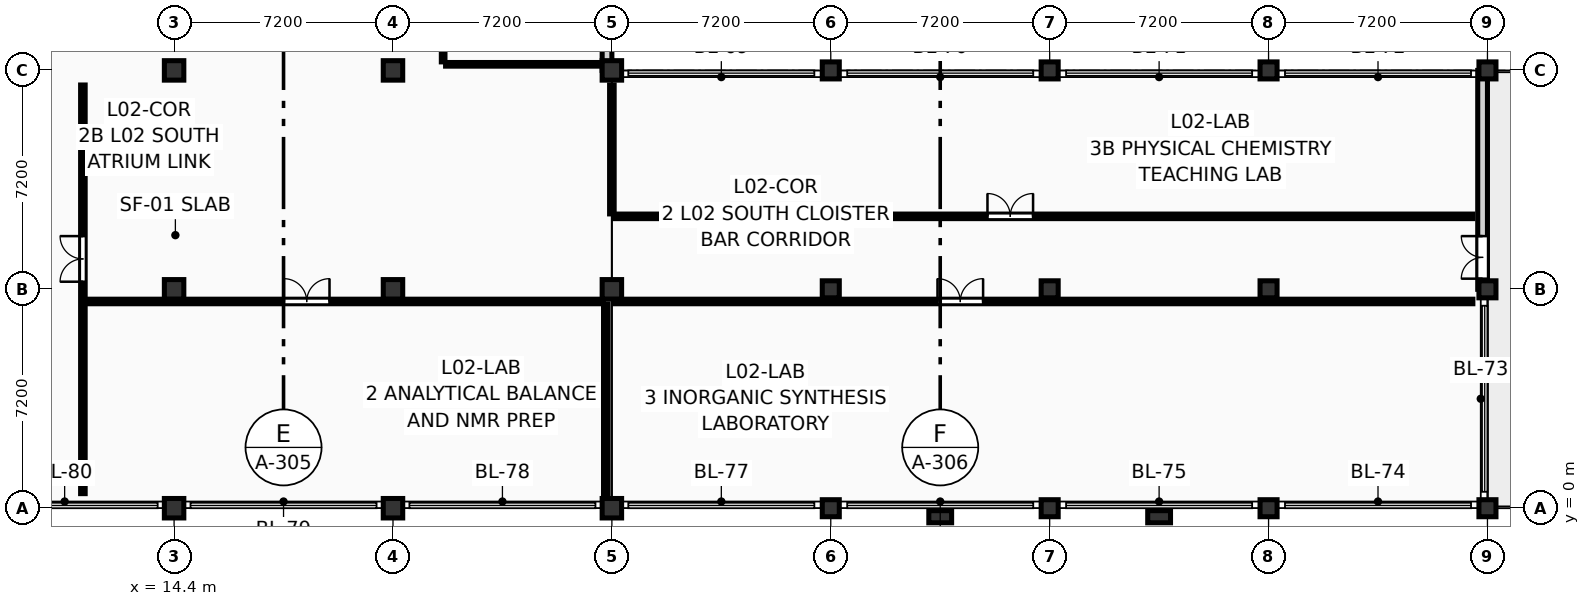
"""IFC4 building model, lengths in metres.
Left out: names, types, materials, properties, quantities, classifications, styles, units other than length and angle.
Written with IfcOpenShell. Run it as: python <this file> out.ifc"""

import sys

from ifc_helpers import new_model, si_unit, direction, frame, frame_2d, origin, origin_2d, place, context, subcontext, project, spatial, rectangle, extrude, element, fill, save


model = new_model("IFC4")
c1 = context("Model", 3, precision=1e-05, world=origin(), true_north=direction((0.0, 1.0)))
c2 = subcontext(c1, "Body", "Model", "MODEL_VIEW")
j1 = project(units=[si_unit("LENGTHUNIT", "METRE"), si_unit("PLANEANGLEUNIT", "RADIAN")], contexts=[c1])
p1 = place(None, origin())
s1 = spatial("IfcSite", under=j1, at=p1, CompositionType="ELEMENT")
p2 = place(p1, origin())
s2 = spatial("IfcBuilding", under=s1, at=p2, CompositionType="ELEMENT")
p3 = place(p2, frame((0.0, 0.0, 8.55)))
s3 = spatial("IfcBuildingStorey", under=s2, at=p3, CompositionType="ELEMENT", Elevation=8.55)
for number, where, z_axis, x_axis in (
    (1, (14.4, 0.0, 0.0), (0.0, 0.0, 1.0), (1.0, 0.0, 0.0)),
    (2, (14.4, 7.2, 0.0), (0.0, 0.0, 1.0), (1.0, 0.0, 0.0)),
    (3, (14.4, 14.4, 0.0), (0.0, 0.0, 1.0), (1.0, 0.0, 0.0)),
    (4, (21.6, 0.0, 0.0), (0.0, 0.0, 1.0), (1.0, 0.0, 0.0)),
    (5, (21.6, 7.2, 0.0), (0.0, 0.0, 1.0), (1.0, 0.0, 0.0)),
    (6, (21.6, 14.4, 0.0), (0.0, 0.0, 1.0), (1.0, 0.0, 0.0)),
    (7, (28.8, 0.0, 0.0), (0.0, 0.0, 1.0), (1.0, 0.0, 0.0)),
    (8, (28.8, 7.2, 0.0), (0.0, 0.0, 1.0), (1.0, 0.0, 0.0)),
    (9, (28.8, 14.4, 0.0), (0.0, 0.0, 1.0), (1.0, 0.0, 0.0)),
):
    element("IfcColumn", number, at=place(p3, frame(where, z_axis=z_axis, x_axis=x_axis)), inside=s3, PredefinedType="COLUMN", context=c2, shape_type="SweptSolid", body=[
        extrude(rectangle(XDim=0.64, YDim=0.64, at=origin_2d()), origin(), (0.0, 0.0, 1.0), 3.6),
    ])
for number, where, z_axis, x_axis in (
    (10, (36.0, 0.0, 0.0), (0.0, 0.0, 1.0), (1.0, 0.0, 0.0)),
    (11, (36.0, 7.2, 0.0), (0.0, 0.0, 1.0), (1.0, 0.0, 0.0)),
    (12, (36.0, 14.4, 0.0), (0.0, 0.0, 1.0), (1.0, 0.0, 0.0)),
    (13, (43.2, 0.0, 0.0), (0.0, 0.0, 1.0), (1.0, 0.0, 0.0)),
    (14, (43.2, 7.2, 0.0), (0.0, 0.0, 1.0), (1.0, 0.0, 0.0)),
    (15, (43.2, 14.4, 0.0), (0.0, 0.0, 1.0), (1.0, 0.0, 0.0)),
    (16, (50.4, 0.0, 0.0), (0.0, 0.0, 1.0), (1.0, 0.0, 0.0)),
    (17, (50.4, 7.2, 0.0), (0.0, 0.0, 1.0), (1.0, 0.0, 0.0)),
    (18, (50.4, 14.4, 0.0), (0.0, 0.0, 1.0), (1.0, 0.0, 0.0)),
    (19, (57.6, 0.0, 0.0), (0.0, 0.0, 1.0), (1.0, 0.0, 0.0)),
    (20, (57.6, 7.2, 0.0), (0.0, 0.0, 1.0), (1.0, 0.0, 0.0)),
    (21, (57.6, 14.4, 0.0), (0.0, 0.0, 1.0), (1.0, 0.0, 0.0)),
):
    element("IfcColumn", number, at=place(p3, frame(where, z_axis=z_axis, x_axis=x_axis)), inside=s3, PredefinedType="COLUMN", context=c2, shape_type="SweptSolid", body=[
        extrude(rectangle(XDim=0.56, YDim=0.56, at=origin_2d()), origin(), (0.0, 0.0, 1.0), 3.6),
    ])
for number, where, z_axis, x_axis in (
    (22, (39.6, -0.28, 0.0), (0.0, 0.0, 1.0), (0.0, 1.0, 0.0)),
    (23, (46.8, -0.28, 0.0), (0.0, 0.0, 1.0), (0.0, 1.0, 0.0)),
):
    element("IfcColumn", number, at=place(p3, frame(where, z_axis=z_axis, x_axis=x_axis)), inside=s3, PredefinedType="PILASTER", context=c2, shape_type="SweptSolid", body=[
        extrude(rectangle(XDim=0.4, YDim=0.75, at=origin_2d()), origin(), (0.0, 0.0, 1.0), 3.6),
    ])
p4 = place(p3, frame((28.64, 14.4, 0.0), z_axis=(0.0, 0.0, 1.0), x_axis=(0.0, 1.0, 0.0)))
e24 = element("IfcWall", 24, at=p4, inside=s3, PredefinedType="SOLIDWALL", context=c2, shape_type="SweptSolid", body=[
    extrude(rectangle(XDim=7.2, YDim=0.32, at=frame_2d((3.6, 0.0))), origin(), (0.0, 0.0, 1.0), 2.84),
])
p5 = place(p4, frame((1.113, 0.0, 0.18)))
e25 = element("IfcOpeningElement", 25, at=p5, cuts=e24, PredefinedType="OPENING", context=c2, shape_type="SweptSolid", body=[
    extrude(rectangle(XDim=1.35, YDim=2.45, at=frame_2d((0.675, 1.225))), frame((0.0, 0.172, 0.0), z_axis=(0.0, -1.0, 0.0), x_axis=(1.0, 0.0, 0.0)), (0.0, 0.0, 1.0), 0.344),
])
p6 = place(p4, frame((2.925, 0.0, 0.18)))
e26 = element("IfcOpeningElement", 26, at=p6, cuts=e24, PredefinedType="OPENING", context=c2, shape_type="SweptSolid", body=[
    extrude(rectangle(XDim=1.35, YDim=2.45, at=frame_2d((0.675, 1.225))), frame((0.0, 0.172, 0.0), z_axis=(0.0, -1.0, 0.0), x_axis=(1.0, 0.0, 0.0)), (0.0, 0.0, 1.0), 0.344),
])
p7 = place(p4, frame((4.738, 0.0, 0.18)))
e27 = element("IfcOpeningElement", 27, at=p7, cuts=e24, PredefinedType="OPENING", context=c2, shape_type="SweptSolid", body=[
    extrude(rectangle(XDim=1.35, YDim=2.45, at=frame_2d((0.675, 1.225))), frame((0.0, 0.172, 0.0), z_axis=(0.0, -1.0, 0.0), x_axis=(1.0, 0.0, 0.0)), (0.0, 0.0, 1.0), 0.344),
])
p8 = place(p3, frame((57.44, 7.2, 0.0), z_axis=(0.0, 0.0, 1.0), x_axis=(0.0, 1.0, 0.0)))
e28 = element("IfcWall", 28, at=p8, inside=s3, PredefinedType="SOLIDWALL", context=c2, shape_type="SweptSolid", body=[
    extrude(rectangle(XDim=7.2, YDim=0.32, at=frame_2d((3.6, 0.0))), origin(), (0.0, 0.0, 1.0), 2.84),
])
p9 = place(p8, frame((0.35, 0.0, 0.0)))
e29 = element("IfcOpeningElement", 29, at=p9, cuts=e28, PredefinedType="OPENING", context=c2, shape_type="SweptSolid", body=[
    extrude(rectangle(XDim=1.4, YDim=2.2, at=frame_2d((0.7, 1.1))), frame((0.0, 0.172, 0.0), z_axis=(0.0, -1.0, 0.0), x_axis=(1.0, 0.0, 0.0)), (0.0, 0.0, 1.0), 0.344),
])
p10 = place(p3, frame((11.4, 0.48, 0.0), z_axis=(0.0, 0.0, 1.0), x_axis=(0.0, 1.0, 0.0)))
e30 = element("IfcWall", 30, at=p10, inside=s3, PredefinedType="PARTITIONING", context=c2, shape_type="SweptSolid", body=[
    extrude(rectangle(XDim=13.44, YDim=0.15, at=frame_2d((6.72, 0.0))), origin(), (0.0, 0.0, 1.0), 3.375),
])
p11 = place(p10, frame((6.97, 0.0, 0.0)))
e31 = element("IfcOpeningElement", 31, at=p11, cuts=e30, PredefinedType="OPENING", context=c2, shape_type="SweptSolid", body=[
    extrude(rectangle(XDim=1.5, YDim=2.2, at=frame_2d((0.75, 1.1))), frame((0.0, 0.087, 0.0), z_axis=(0.0, -1.0, 0.0), x_axis=(1.0, 0.0, 0.0)), (0.0, 0.0, 1.0), 0.174),
])
p12 = place(p3, frame((28.6, 0.48, 0.0), z_axis=(0.0, 0.0, 1.0), x_axis=(0.0, 1.0, 0.0)))
e32 = element("IfcWall", 32, at=p12, inside=s3, PredefinedType="PARTITIONING", context=c2, shape_type="SweptSolid", body=[
    extrude(rectangle(XDim=6.24, YDim=0.15, at=frame_2d((3.12, 0.0))), origin(), (0.0, 0.0, 1.0), 2.655),
])
p13 = place(p3, frame((11.515, 6.8, 0.0), z_axis=(0.0, 0.0, 1.0), x_axis=(1.0, 0.0, 0.0)))
e33 = element("IfcWall", 33, at=p13, inside=s3, PredefinedType="PARTITIONING", context=c2, shape_type="SweptSolid", body=[
    extrude(rectangle(XDim=17.005, YDim=0.15, at=frame_2d((8.502, 0.0))), origin(), (0.0, 0.0, 1.0), 3.375),
])
p14 = place(p13, frame((6.497, 0.0, 0.0)))
e34 = element("IfcOpeningElement", 34, at=p14, cuts=e33, PredefinedType="OPENING", context=c2, shape_type="SweptSolid", body=[
    extrude(rectangle(XDim=1.5, YDim=2.2, at=frame_2d((0.75, 1.1))), frame((0.0, 0.087, 0.0), z_axis=(0.0, -1.0, 0.0), x_axis=(1.0, 0.0, 0.0)), (0.0, 0.0, 1.0), 0.174),
])
p15 = place(p3, frame((28.88, 6.8, 0.0), z_axis=(0.0, 0.0, 1.0), x_axis=(1.0, 0.0, 0.0)))
e35 = element("IfcWall", 35, at=p15, inside=s3, PredefinedType="PARTITIONING", context=c2, shape_type="SweptSolid", body=[
    extrude(rectangle(XDim=28.24, YDim=0.15, at=frame_2d((14.12, 0.0))), origin(), (0.0, 0.0, 1.0), 3.375),
])
p16 = place(p15, frame((10.63, 0.0, 0.0)))
e36 = element("IfcOpeningElement", 36, at=p16, cuts=e35, PredefinedType="OPENING", context=c2, shape_type="SweptSolid", body=[
    extrude(rectangle(XDim=1.5, YDim=2.2, at=frame_2d((0.75, 1.1))), frame((0.0, 0.087, 0.0), z_axis=(0.0, -1.0, 0.0), x_axis=(1.0, 0.0, 0.0)), (0.0, 0.0, 1.0), 0.174),
])
p17 = place(p3, frame((28.8, 9.68, 0.0), z_axis=(0.0, 0.0, 1.0), x_axis=(0.0, 1.0, 0.0)))
e37 = element("IfcWall", 37, at=p17, inside=s3, PredefinedType="PARTITIONING", context=c2, shape_type="SweptSolid", body=[
    extrude(rectangle(XDim=4.24, YDim=0.15, at=frame_2d((2.12, 0.0))), origin(), (0.0, 0.0, 1.0), 2.655),
])
p18 = place(p3, frame((28.88, 9.6, 0.0), z_axis=(0.0, 0.0, 1.0), x_axis=(1.0, 0.0, 0.0)))
e38 = element("IfcWall", 38, at=p18, inside=s3, PredefinedType="PARTITIONING", context=c2, shape_type="SweptSolid", body=[
    extrude(rectangle(XDim=28.24, YDim=0.15, at=frame_2d((14.12, 0.0))), origin(), (0.0, 0.0, 1.0), 3.375),
])
p19 = place(p18, frame((12.274, 0.0, 0.0)))
e39 = element("IfcOpeningElement", 39, at=p19, cuts=e38, PredefinedType="OPENING", context=c2, shape_type="SweptSolid", body=[
    extrude(rectangle(XDim=1.5, YDim=2.2, at=frame_2d((0.75, 1.1))), frame((0.0, 0.087, 0.0), z_axis=(0.0, -1.0, 0.0), x_axis=(1.0, 0.0, 0.0)), (0.0, 0.0, 1.0), 0.174),
])
p20 = place(p3, frame((23.25, 14.68, 0.0), z_axis=(0.0, 0.0, 1.0), x_axis=(0.0, 1.0, 0.0)))
e40 = element("IfcWall", 40, at=p20, inside=s3, PredefinedType="PARTITIONING", context=c2, shape_type="SweptSolid", body=[
    extrude(rectangle(XDim=6.84, YDim=0.12, at=frame_2d((3.42, 0.0))), origin(), (0.0, 0.0, 1.0), 3.375),
])
p21 = place(p20, frame((2.845, 0.0, 0.0)))
e41 = element("IfcOpeningElement", 41, at=p21, cuts=e40, PredefinedType="OPENING", context=c2, shape_type="SweptSolid", body=[
    extrude(rectangle(XDim=1.15, YDim=2.18, at=frame_2d((0.575, 1.09))), frame((0.0, 0.072, 0.0), z_axis=(0.0, -1.0, 0.0), x_axis=(1.0, 0.0, 0.0)), (0.0, 0.0, 1.0), 0.144),
])
p22 = place(p3, frame((23.33, 14.6, 0.0), z_axis=(0.0, 0.0, 1.0), x_axis=(1.0, 0.0, 0.0)))
e42 = element("IfcWall", 42, at=p22, inside=s3, PredefinedType="PARTITIONING", context=c2, shape_type="SweptSolid", body=[
    extrude(rectangle(XDim=5.09, YDim=0.12, at=frame_2d((2.545, 0.0))), origin(), (0.0, 0.0, 1.0), 2.595),
])
p23 = place(p9, origin())
e43 = element("IfcDoor", 43, at=p23, inside=s3, OperationType="DOUBLE_DOOR_SINGLE_SWING", PredefinedType="DOOR", context=c2, shape_type="SweptSolid", body=[
    extrude(rectangle(XDim=1.4, YDim=2.2, at=frame_2d((0.7, 1.1))), frame((0.0, 0.025, 0.0), z_axis=(0.0, -1.0, 0.0), x_axis=(1.0, 0.0, 0.0)), (0.0, 0.0, 1.0), 0.05),
])
fill(e29, e43)
p24 = place(p11, origin())
e44 = element("IfcDoor", 44, at=p24, inside=s3, OperationType="DOUBLE_DOOR_SINGLE_SWING", PredefinedType="DOOR", context=c2, shape_type="SweptSolid", body=[
    extrude(rectangle(XDim=1.5, YDim=2.2, at=frame_2d((0.75, 1.1))), frame((0.0, 0.025, 0.0), z_axis=(0.0, -1.0, 0.0), x_axis=(1.0, 0.0, 0.0)), (0.0, 0.0, 1.0), 0.05),
])
fill(e31, e44)
p25 = place(p14, origin())
e45 = element("IfcDoor", 45, at=p25, inside=s3, OperationType="DOUBLE_DOOR_SINGLE_SWING", PredefinedType="DOOR", context=c2, shape_type="SweptSolid", body=[
    extrude(rectangle(XDim=1.5, YDim=2.2, at=frame_2d((0.75, 1.1))), frame((0.0, 0.025, 0.0), z_axis=(0.0, -1.0, 0.0), x_axis=(1.0, 0.0, 0.0)), (0.0, 0.0, 1.0), 0.05),
])
fill(e34, e45)
p26 = place(p16, origin())
e46 = element("IfcDoor", 46, at=p26, inside=s3, OperationType="DOUBLE_DOOR_SINGLE_SWING", PredefinedType="DOOR", context=c2, shape_type="SweptSolid", body=[
    extrude(rectangle(XDim=1.5, YDim=2.2, at=frame_2d((0.75, 1.1))), frame((0.0, 0.025, 0.0), z_axis=(0.0, -1.0, 0.0), x_axis=(1.0, 0.0, 0.0)), (0.0, 0.0, 1.0), 0.05),
])
fill(e36, e46)
p27 = place(p19, origin())
e47 = element("IfcDoor", 47, at=p27, inside=s3, OperationType="DOUBLE_DOOR_SINGLE_SWING", PredefinedType="DOOR", context=c2, shape_type="SweptSolid", body=[
    extrude(rectangle(XDim=1.5, YDim=2.2, at=frame_2d((0.75, 1.1))), frame((0.0, 0.025, 0.0), z_axis=(0.0, -1.0, 0.0), x_axis=(1.0, 0.0, 0.0)), (0.0, 0.0, 1.0), 0.05),
])
fill(e39, e47)
save(model, sys.argv[1])
